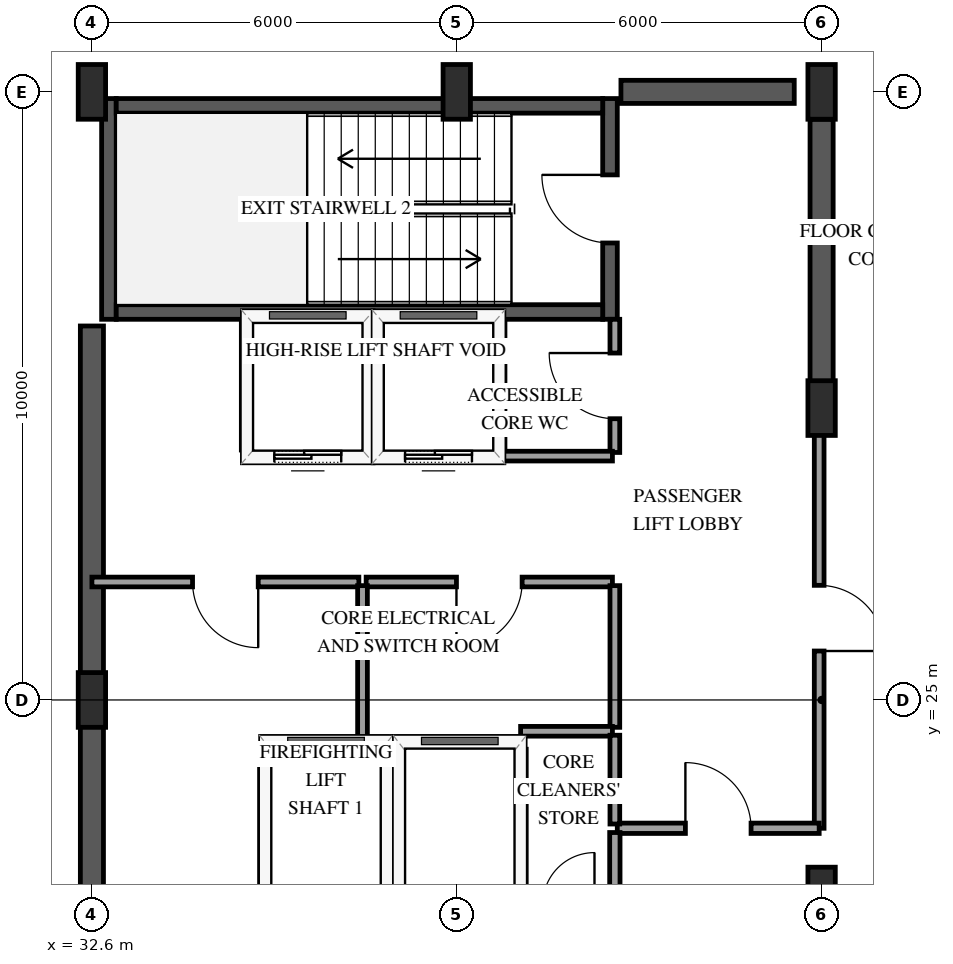
"""IFC4 building model, lengths in metres.
Left out: names, types, materials, properties, quantities, classifications, styles, units other than length and angle.
Written with IfcOpenShell. Run it as: python <this file> out.ifc"""

import sys

from ifc_helpers import new_model, si_unit, direction, frame, frame_2d, origin, origin_2d, place, context, subcontext, project, spatial, rectangle, extrude, element, fill, save


model = new_model("IFC4")
c1 = context("Model", 3, precision=1e-05, world=origin(), true_north=direction((0.0, 1.0)))
c2 = subcontext(c1, "Body", "Model", "MODEL_VIEW")
j1 = project(units=[si_unit("LENGTHUNIT", "METRE"), si_unit("PLANEANGLEUNIT", "RADIAN")], contexts=[c1])
p1 = place(None, origin())
s1 = spatial("IfcSite", under=j1, at=p1, CompositionType="ELEMENT")
p2 = place(p1, origin())
s2 = spatial("IfcBuilding", under=s1, at=p2, CompositionType="ELEMENT")
p3 = place(p2, frame((0.0, 0.0, 288.55)))
s3 = spatial("IfcBuildingStorey", under=s2, at=p3, CompositionType="ELEMENT", Elevation=288.55)
p4 = place(p3, frame((32.88, 31.26, 0.0), z_axis=(0.0, 0.0, 1.0), x_axis=(0.0, 1.0, 0.0)))
e1 = element("IfcWall", 1, at=p4, inside=s3, PredefinedType="SHEAR", context=c2, shape_type="SweptSolid", body=[
    extrude(rectangle(XDim=3.63, YDim=0.24, at=frame_2d((1.815, 0.0))), origin(), (0.0, 0.0, 1.0), 4.5),
])
p5 = place(p3, frame((41.12, 31.26, 0.0), z_axis=(0.0, 0.0, 1.0), x_axis=(0.0, 1.0, 0.0)))
e2 = element("IfcWall", 2, at=p5, inside=s3, PredefinedType="SHEAR", context=c2, shape_type="SweptSolid", body=[
    extrude(rectangle(XDim=3.63, YDim=0.24, at=frame_2d((1.815, 0.0))), origin(), (0.0, 0.0, 1.0), 4.5),
])
p6 = place(p5, frame((1.255, 0.0, 0.0)))
e3 = element("IfcOpeningElement", 3, at=p6, cuts=e2, PredefinedType="OPENING", context=c2, shape_type="SweptSolid", body=[
    extrude(rectangle(XDim=1.12, YDim=2.15, at=frame_2d((0.56, 1.075))), frame((0.0, 0.13, 0.0), z_axis=(0.0, -1.0, 0.0), x_axis=(1.0, 0.0, 0.0)), (0.0, 0.0, 1.0), 0.26),
])
for number, where, z_axis, x_axis in (
    (4, (33.0, 31.38, 0.0), (0.0, 0.0, 1.0), (1.0, 0.0, 0.0)),
    (5, (33.0, 34.77, 0.0), (0.0, 0.0, 1.0), (1.0, 0.0, 0.0)),
):
    element("IfcWall", number, at=place(p3, frame(where, z_axis=z_axis, x_axis=x_axis)), inside=s3, PredefinedType="SHEAR", context=c2, shape_type="SweptSolid", body=[
        extrude(rectangle(XDim=8.0, YDim=0.24, at=frame_2d((4.0, 0.0))), origin(), (0.0, 0.0, 1.0), 4.5),
    ])
p7 = place(p3, frame((32.6, 18.85, 0.0), z_axis=(0.0, 0.0, 1.0), x_axis=(0.0, 1.0, 0.0)))
e6 = element("IfcWall", 6, at=p7, inside=s3, PredefinedType="SHEAR", context=c2, shape_type="SweptSolid", body=[
    extrude(rectangle(XDim=12.3, YDim=0.38, at=frame_2d((6.15, 0.0))), origin(), (0.0, 0.0, 1.0), 4.5),
])
p8 = place(p3, frame((41.3, 35.0, 0.0), z_axis=(0.0, 0.0, 1.0), x_axis=(1.0, 0.0, 0.0)))
e7 = element("IfcWall", 7, at=p8, inside=s3, PredefinedType="SHEAR", context=c2, shape_type="SweptSolid", body=[
    extrude(rectangle(XDim=2.85, YDim=0.38, at=frame_2d((1.425, 0.0))), origin(), (0.0, 0.0, 1.0), 4.5),
])
p9 = place(p3, frame((44.6, 29.8, 0.0), z_axis=(0.0, 0.0, 1.0), x_axis=(0.0, 1.0, 0.0)))
e8 = element("IfcWall", 8, at=p9, inside=s3, PredefinedType="SHEAR", context=c2, shape_type="SweptSolid", body=[
    extrude(rectangle(XDim=4.75, YDim=0.38, at=frame_2d((2.375, 0.0))), origin(), (0.0, 0.0, 1.0), 4.5),
])
for number, where, z_axis, x_axis in (
    (9, (32.6, 25.0, 0.0), (0.0, 0.0, 1.0), (1.0, 0.0, 0.0)),
    (10, (32.6, 35.0, 0.0), (0.0, 0.0, 1.0), (1.0, 0.0, 0.0)),
    (11, (38.6, 35.0, 0.0), (0.0, 0.0, 1.0), (1.0, 0.0, 0.0)),
    (12, (44.6, 21.8, 0.0), (0.0, 0.0, 1.0), (1.0, 0.0, 0.0)),
    (13, (44.6, 29.8, 0.0), (0.0, 0.0, 1.0), (1.0, 0.0, 0.0)),
    (14, (44.6, 35.0, 0.0), (0.0, 0.0, 1.0), (1.0, 0.0, 0.0)),
):
    element("IfcColumn", number, at=place(p3, frame(where, z_axis=z_axis, x_axis=x_axis)), inside=s3, PredefinedType="PILASTER", context=c2, shape_type="SweptSolid", body=[
        extrude(rectangle(XDim=0.45, YDim=0.9, at=origin_2d()), origin(), (0.0, 0.0, 1.0), 4.195),
    ])
p10 = place(p3, frame((35.45, 24.3, 0.0), z_axis=(0.0, 0.0, 1.0), x_axis=(1.0, 0.0, 0.0)))
e15 = element("IfcWall", 15, at=p10, inside=s3, PredefinedType="SOLIDWALL", context=c2, shape_type="SweptSolid", body=[
    extrude(rectangle(XDim=2.0, YDim=0.185, at=frame_2d((1.0, 0.0))), origin(), (0.0, 0.0, 1.0), 4.195),
])
for number, where, z_axis, x_axis in (
    (16, (35.45, 21.81, 0.0), (0.0, 0.0, 1.0), (0.0, 1.0, 0.0)),
    (17, (37.45, 21.81, 0.0), (0.0, 0.0, 1.0), (0.0, 1.0, 0.0)),
):
    element("IfcWall", number, at=place(p3, frame(where, z_axis=z_axis, x_axis=x_axis)), inside=s3, PredefinedType="SOLIDWALL", context=c2, shape_type="SweptSolid", body=[
        extrude(rectangle(XDim=2.38, YDim=0.185, at=frame_2d((1.19, 0.0))), origin(), (0.0, 0.0, 1.0), 4.195),
    ])
p11 = place(p3, frame((37.65, 24.3, 0.0), z_axis=(0.0, 0.0, 1.0), x_axis=(1.0, 0.0, 0.0)))
e18 = element("IfcWall", 18, at=p11, inside=s3, PredefinedType="SOLIDWALL", context=c2, shape_type="SweptSolid", body=[
    extrude(rectangle(XDim=2.0, YDim=0.185, at=frame_2d((1.0, 0.0))), origin(), (0.0, 0.0, 1.0), 4.195),
])
p12 = place(p3, frame((39.65, 21.81, 0.0), z_axis=(0.0, 0.0, 1.0), x_axis=(0.0, 1.0, 0.0)))
e19 = element("IfcWall", 19, at=p12, inside=s3, PredefinedType="SOLIDWALL", context=c2, shape_type="SweptSolid", body=[
    extrude(rectangle(XDim=2.38, YDim=0.185, at=frame_2d((1.19, 0.0))), origin(), (0.0, 0.0, 1.0), 4.195),
])
p13 = place(p3, frame((35.15, 29.0, 0.0), z_axis=(0.0, 0.0, 1.0), x_axis=(1.0, 0.0, 0.0)))
e20 = element("IfcWall", 20, at=p13, inside=s3, PredefinedType="SOLIDWALL", context=c2, shape_type="SweptSolid", body=[
    extrude(rectangle(XDim=2.0, YDim=0.185, at=frame_2d((1.0, 0.0))), origin(), (0.0, 0.0, 1.0), 4.195),
])
p14 = place(p13, frame((0.45, 0.0, 0.0)))
e21 = element("IfcOpeningElement", 21, at=p14, cuts=e20, PredefinedType="OPENING", context=c2, shape_type="SweptSolid", body=[
    extrude(rectangle(XDim=1.1, YDim=2.15, at=frame_2d((0.55, 1.075))), frame((0.0, 0.103, 0.0), z_axis=(0.0, -1.0, 0.0), x_axis=(1.0, 0.0, 0.0)), (0.0, 0.0, 1.0), 0.205),
])
for number, where, z_axis, x_axis in (
    (22, (35.15, 29.11, 0.0), (0.0, 0.0, 1.0), (0.0, 1.0, 0.0)),
    (23, (37.15, 29.11, 0.0), (0.0, 0.0, 1.0), (0.0, 1.0, 0.0)),
):
    element("IfcWall", number, at=place(p3, frame(where, z_axis=z_axis, x_axis=x_axis)), inside=s3, PredefinedType="SOLIDWALL", context=c2, shape_type="SweptSolid", body=[
        extrude(rectangle(XDim=2.1, YDim=0.185, at=frame_2d((1.05, 0.0))), origin(), (0.0, 0.0, 1.0), 4.195),
    ])
p15 = place(p3, frame((37.3, 29.0, 0.0), z_axis=(0.0, 0.0, 1.0), x_axis=(1.0, 0.0, 0.0)))
e24 = element("IfcWall", 24, at=p15, inside=s3, PredefinedType="SOLIDWALL", context=c2, shape_type="SweptSolid", body=[
    extrude(rectangle(XDim=2.0, YDim=0.185, at=frame_2d((1.0, 0.0))), origin(), (0.0, 0.0, 1.0), 4.195),
])
p16 = place(p15, frame((0.45, 0.0, 0.0)))
e25 = element("IfcOpeningElement", 25, at=p16, cuts=e24, PredefinedType="OPENING", context=c2, shape_type="SweptSolid", body=[
    extrude(rectangle(XDim=1.1, YDim=2.15, at=frame_2d((0.55, 1.075))), frame((0.0, 0.103, 0.0), z_axis=(0.0, -1.0, 0.0), x_axis=(1.0, 0.0, 0.0)), (0.0, 0.0, 1.0), 0.205),
])
p17 = place(p3, frame((39.3, 29.11, 0.0), z_axis=(0.0, 0.0, 1.0), x_axis=(0.0, 1.0, 0.0)))
e26 = element("IfcWall", 26, at=p17, inside=s3, PredefinedType="SOLIDWALL", context=c2, shape_type="SweptSolid", body=[
    extrude(rectangle(XDim=2.1, YDim=0.185, at=frame_2d((1.05, 0.0))), origin(), (0.0, 0.0, 1.0), 4.195),
])
p18 = place(p3, frame((44.56, 29.8, 0.0), z_axis=(0.0, 0.0, 1.0), x_axis=(0.0, -1.0, 0.0)))
e27 = element("IfcWall", 27, at=p18, inside=s3, PredefinedType="PARTITIONING", context=c2, shape_type="SweptSolid", body=[
    extrude(rectangle(XDim=6.91, YDim=0.16, at=frame_2d((3.455, 0.0))), origin(), (0.0, 0.0, 1.0), 3.235),
])
p19 = place(p18, frame((2.915, 0.0, 0.0)))
e28 = element("IfcOpeningElement", 28, at=p19, cuts=e27, PredefinedType="OPENING", context=c2, shape_type="SweptSolid", body=[
    extrude(rectangle(XDim=1.08, YDim=2.15, at=frame_2d((0.54, 1.075))), frame((0.0, 0.09, 0.0), z_axis=(0.0, -1.0, 0.0), x_axis=(1.0, 0.0, 0.0)), (0.0, 0.0, 1.0), 0.18),
])
p20 = place(p3, frame((36.99, 26.94, 0.0), z_axis=(0.0, 0.0, 1.0), x_axis=(-1.0, 0.0, 0.0)))
e29 = element("IfcWall", 29, at=p20, inside=s3, PredefinedType="PARTITIONING", context=c2, shape_type="SweptSolid", body=[
    extrude(rectangle(XDim=4.39, YDim=0.16, at=frame_2d((2.195, 0.0))), origin(), (0.0, 0.0, 1.0), 4.195),
])
p21 = place(p20, frame((1.655, 0.0, 0.0)))
e30 = element("IfcOpeningElement", 30, at=p21, cuts=e29, PredefinedType="OPENING", context=c2, shape_type="SweptSolid", body=[
    extrude(rectangle(XDim=1.08, YDim=2.15, at=frame_2d((0.54, 1.075))), frame((0.0, 0.09, 0.0), z_axis=(0.0, -1.0, 0.0), x_axis=(1.0, 0.0, 0.0)), (0.0, 0.0, 1.0), 0.18),
])
p22 = place(p3, frame((41.16, 26.94, 0.0), z_axis=(0.0, 0.0, 1.0), x_axis=(-1.0, 0.0, 0.0)))
e31 = element("IfcWall", 31, at=p22, inside=s3, PredefinedType="PARTITIONING", context=c2, shape_type="SweptSolid", body=[
    extrude(rectangle(XDim=4.05, YDim=0.16, at=frame_2d((2.025, 0.0))), origin(), (0.0, 0.0, 1.0), 4.195),
])
p23 = place(p22, frame((1.485, 0.0, 0.0)))
e32 = element("IfcOpeningElement", 32, at=p23, cuts=e31, PredefinedType="OPENING", context=c2, shape_type="SweptSolid", body=[
    extrude(rectangle(XDim=1.08, YDim=2.15, at=frame_2d((0.54, 1.075))), frame((0.0, 0.09, 0.0), z_axis=(0.0, -1.0, 0.0), x_axis=(1.0, 0.0, 0.0)), (0.0, 0.0, 1.0), 0.18),
])
p24 = place(p3, frame((41.24, 22.89, 0.0), z_axis=(0.0, 0.0, 1.0), x_axis=(1.0, 0.0, 0.0)))
e33 = element("IfcWall", 33, at=p24, inside=s3, PredefinedType="PARTITIONING", context=c2, shape_type="SweptSolid", body=[
    extrude(rectangle(XDim=3.32, YDim=0.17, at=frame_2d((1.66, 0.0))), origin(), (0.0, 0.0, 1.0), 4.195),
])
p25 = place(p24, frame((1.12, 0.0, 0.0)))
e34 = element("IfcOpeningElement", 34, at=p25, cuts=e33, PredefinedType="OPENING", context=c2, shape_type="SweptSolid", body=[
    extrude(rectangle(XDim=1.08, YDim=2.15, at=frame_2d((0.54, 1.075))), frame((0.0, 0.095, 0.0), z_axis=(0.0, -1.0, 0.0), x_axis=(1.0, 0.0, 0.0)), (0.0, 0.0, 1.0), 0.19),
])
p26 = place(p3, frame((37.05, 26.88, 0.0), z_axis=(0.0, 0.0, 1.0), x_axis=(0.0, -1.0, 0.0)))
e35 = element("IfcWall", 35, at=p26, inside=s3, PredefinedType="PARTITIONING", context=c2, shape_type="SweptSolid", body=[
    extrude(rectangle(XDim=2.58, YDim=0.16, at=frame_2d((1.29, 0.0))), origin(), (0.0, 0.0, 1.0), 4.195),
])
p27 = place(p3, frame((41.2, 24.55, 0.0), z_axis=(0.0, 0.0, 1.0), x_axis=(0.0, 1.0, 0.0)))
e36 = element("IfcWall", 36, at=p27, inside=s3, PredefinedType="PARTITIONING", context=c2, shape_type="SweptSolid", body=[
    extrude(rectangle(XDim=2.33, YDim=0.16, at=frame_2d((1.165, 0.0))), origin(), (0.0, 0.0, 1.0), 4.195),
])
p28 = place(p3, frame((41.2, 29.07, 0.0), z_axis=(0.0, 0.0, 1.0), x_axis=(0.0, 1.0, 0.0)))
e37 = element("IfcWall", 37, at=p28, inside=s3, PredefinedType="PARTITIONING", context=c2, shape_type="SweptSolid", body=[
    extrude(rectangle(XDim=2.19, YDim=0.16, at=frame_2d((1.095, 0.0))), origin(), (0.0, 0.0, 1.0), 4.195),
])
p29 = place(p28, frame((0.555, 0.0, 0.0)))
e38 = element("IfcOpeningElement", 38, at=p29, cuts=e37, PredefinedType="OPENING", context=c2, shape_type="SweptSolid", body=[
    extrude(rectangle(XDim=1.08, YDim=2.15, at=frame_2d((0.54, 1.075))), frame((0.0, 0.09, 0.0), z_axis=(0.0, -1.0, 0.0), x_axis=(1.0, 0.0, 0.0)), (0.0, 0.0, 1.0), 0.18),
])
p30 = place(p3, frame((39.3, 29.01, 0.0), z_axis=(0.0, 0.0, 1.0), x_axis=(1.0, 0.0, 0.0)))
e39 = element("IfcWall", 39, at=p30, inside=s3, PredefinedType="PARTITIONING", context=c2, shape_type="SweptSolid", body=[
    extrude(rectangle(XDim=1.86, YDim=0.16, at=frame_2d((0.93, 0.0))), origin(), (0.0, 0.0, 1.0), 4.195),
])
p31 = place(p3, frame((39.65, 24.485, 0.0), z_axis=(0.0, 0.0, 1.0), x_axis=(1.0, 0.0, 0.0)))
e40 = element("IfcWall", 40, at=p31, inside=s3, PredefinedType="PARTITIONING", context=c2, shape_type="SweptSolid", body=[
    extrude(rectangle(XDim=1.51, YDim=0.16, at=frame_2d((0.755, 0.0))), origin(), (0.0, 0.0, 1.0), 4.195),
])
p32 = place(p3, frame((41.2, 22.96, 0.0), z_axis=(0.0, 0.0, 1.0), x_axis=(0.0, 1.0, 0.0)))
e41 = element("IfcWall", 41, at=p32, inside=s3, PredefinedType="PARTITIONING", context=c2, shape_type="SweptSolid", body=[
    extrude(rectangle(XDim=1.46, YDim=0.16, at=frame_2d((0.73, 0.0))), origin(), (0.0, 0.0, 1.0), 4.195),
])
p33 = place(p3, frame((41.2, 21.7, 0.0), z_axis=(0.0, 0.0, 1.0), x_axis=(0.0, 1.0, 0.0)))
e42 = element("IfcWall", 42, at=p33, inside=s3, PredefinedType="PARTITIONING", context=c2, shape_type="SweptSolid", body=[
    extrude(rectangle(XDim=1.12, YDim=0.17, at=frame_2d((0.56, 0.0))), origin(), (0.0, 0.0, 1.0), 4.195),
])
p34 = place(p14, origin())
e43 = element("IfcDoor", 43, at=p34, inside=s3, OperationType="SLIDING_TO_LEFT", PredefinedType="DOOR", context=c2, shape_type="SweptSolid", body=[
    extrude(rectangle(XDim=1.1, YDim=2.15, at=frame_2d((0.55, 1.075))), frame((0.0, 0.025, 0.0), z_axis=(0.0, -1.0, 0.0), x_axis=(1.0, 0.0, 0.0)), (0.0, 0.0, 1.0), 0.05),
])
fill(e21, e43)
p35 = place(p16, origin())
e44 = element("IfcDoor", 44, at=p35, inside=s3, OperationType="SLIDING_TO_LEFT", PredefinedType="DOOR", context=c2, shape_type="SweptSolid", body=[
    extrude(rectangle(XDim=1.1, YDim=2.15, at=frame_2d((0.55, 1.075))), frame((0.0, 0.025, 0.0), z_axis=(0.0, -1.0, 0.0), x_axis=(1.0, 0.0, 0.0)), (0.0, 0.0, 1.0), 0.05),
])
fill(e25, e44)
p36 = place(p6, origin())
e45 = element("IfcDoor", 45, at=p36, inside=s3, OperationType="SINGLE_SWING_RIGHT", PredefinedType="DOOR", context=c2, shape_type="SweptSolid", body=[
    extrude(rectangle(XDim=1.12, YDim=2.15, at=frame_2d((0.56, 1.075))), frame((0.0, 0.025, 0.0), z_axis=(0.0, -1.0, 0.0), x_axis=(1.0, 0.0, 0.0)), (0.0, 0.0, 1.0), 0.05),
])
fill(e3, e45)
p37 = place(p19, origin())
e46 = element("IfcDoor", 46, at=p37, inside=s3, OperationType="SINGLE_SWING_RIGHT", PredefinedType="DOOR", context=c2, shape_type="SweptSolid", body=[
    extrude(rectangle(XDim=1.08, YDim=2.15, at=frame_2d((0.54, 1.075))), frame((0.0, 0.025, 0.0), z_axis=(0.0, -1.0, 0.0), x_axis=(1.0, 0.0, 0.0)), (0.0, 0.0, 1.0), 0.05),
])
fill(e28, e46)
p38 = place(p21, origin())
e47 = element("IfcDoor", 47, at=p38, inside=s3, OperationType="SINGLE_SWING_LEFT", PredefinedType="DOOR", context=c2, shape_type="SweptSolid", body=[
    extrude(rectangle(XDim=1.08, YDim=2.15, at=frame_2d((0.54, 1.075))), frame((0.0, 0.025, 0.0), z_axis=(0.0, -1.0, 0.0), x_axis=(1.0, 0.0, 0.0)), (0.0, 0.0, 1.0), 0.05),
])
fill(e30, e47)
p39 = place(p23, origin())
e48 = element("IfcDoor", 48, at=p39, inside=s3, OperationType="SINGLE_SWING_RIGHT", PredefinedType="DOOR", context=c2, shape_type="SweptSolid", body=[
    extrude(rectangle(XDim=1.08, YDim=2.15, at=frame_2d((0.54, 1.075))), frame((0.0, 0.025, 0.0), z_axis=(0.0, -1.0, 0.0), x_axis=(1.0, 0.0, 0.0)), (0.0, 0.0, 1.0), 0.05),
])
fill(e32, e48)
p40 = place(p25, origin())
e49 = element("IfcDoor", 49, at=p40, inside=s3, OperationType="SINGLE_SWING_LEFT", PredefinedType="DOOR", context=c2, shape_type="SweptSolid", body=[
    extrude(rectangle(XDim=1.08, YDim=2.15, at=frame_2d((0.54, 1.075))), frame((0.0, 0.025, 0.0), z_axis=(0.0, -1.0, 0.0), x_axis=(1.0, 0.0, 0.0)), (0.0, 0.0, 1.0), 0.05),
])
fill(e34, e49)
p41 = place(p29, origin())
e50 = element("IfcDoor", 50, at=p41, inside=s3, OperationType="SINGLE_SWING_RIGHT", PredefinedType="DOOR", context=c2, shape_type="SweptSolid", body=[
    extrude(rectangle(XDim=1.08, YDim=2.15, at=frame_2d((0.54, 1.075))), frame((0.0, 0.025, 0.0), z_axis=(0.0, -1.0, 0.0), x_axis=(1.0, 0.0, 0.0)), (0.0, 0.0, 1.0), 0.05),
])
fill(e38, e50)
save(model, sys.argv[1])
